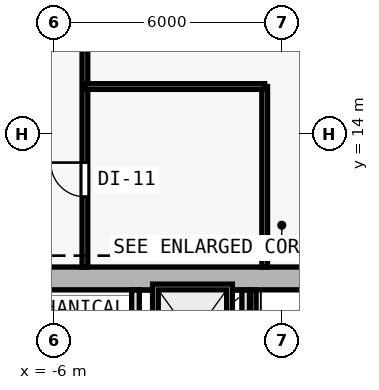
"""IFC4 building model, lengths in metres.
Left out: names, types, materials, properties, quantities, classifications, styles, units other than length and angle.
Written with IfcOpenShell. Run it as: python <this file> out.ifc"""

import sys

from ifc_helpers import new_model, si_unit, direction, frame, frame_2d, origin, place, context, subcontext, project, spatial, rectangle, extrude, element, fill, save


model = new_model("IFC4")
c1 = context("Model", 3, precision=1e-05, world=origin(), true_north=direction((0.0, 1.0)))
c2 = subcontext(c1, "Body", "Model", "MODEL_VIEW")
j1 = project(units=[si_unit("LENGTHUNIT", "METRE"), si_unit("PLANEANGLEUNIT", "RADIAN")], contexts=[c1])
p1 = place(None, origin())
s1 = spatial("IfcSite", under=j1, at=p1, CompositionType="ELEMENT")
p2 = place(p1, origin())
s2 = spatial("IfcBuilding", under=s1, at=p2, CompositionType="ELEMENT")
p3 = place(p2, frame((0.0, 0.0, 9.2)))
s3 = spatial("IfcBuildingStorey", under=s2, at=p3, CompositionType="ELEMENT", Elevation=9.2)
p4 = place(p3, frame((8.0, 10.2, 0.0), z_axis=(0.0, 0.0, 1.0), x_axis=(-1.0, 0.0, 0.0)))
e1 = element("IfcWall", 1, at=p4, inside=s3, PredefinedType="SHEAR", context=c2, shape_type="SweptSolid", body=[
    extrude(rectangle(XDim=16.0, YDim=0.6, at=frame_2d((8.0, 0.0))), origin(), (0.0, 0.0, 1.0), 3.92),
])
p5 = place(p4, frame((4.45, 0.0, 0.0)))
e2 = element("IfcOpeningElement", 2, at=p5, cuts=e1, PredefinedType="OPENING", context=c2, shape_type="SweptSolid", body=[
    extrude(rectangle(XDim=1.1, YDim=2.15, at=frame_2d((0.55, 1.075))), frame((0.0, 0.31, 0.0), z_axis=(0.0, -1.0, 0.0), x_axis=(1.0, 0.0, 0.0)), (0.0, 0.0, 1.0), 0.62),
])
p6 = place(p3, frame((-3.85, 1.35, 0.0), z_axis=(0.0, 0.0, 1.0), x_axis=(0.0, 1.0, 0.0)))
e3 = element("IfcWall", 3, at=p6, inside=s3, PredefinedType="SOLIDWALL", context=c2, shape_type="SweptSolid", body=[
    extrude(rectangle(XDim=8.545, YDim=0.2, at=frame_2d((4.272, 0.0))), origin(), (0.0, 0.0, 1.0), 3.92),
])
p7 = place(p6, frame((1.5, 0.0, 0.0)))
e4 = element("IfcOpeningElement", 4, at=p7, cuts=e3, PredefinedType="OPENING", context=c2, shape_type="SweptSolid", body=[
    extrude(rectangle(XDim=1.0, YDim=2.15, at=frame_2d((0.5, 1.075))), frame((0.0, 0.11, 0.0), z_axis=(0.0, -1.0, 0.0), x_axis=(1.0, 0.0, 0.0)), (0.0, 0.0, 1.0), 0.22),
])
p8 = place(p6, frame((3.18, 0.0, 0.0)))
e5 = element("IfcOpeningElement", 5, at=p8, cuts=e3, PredefinedType="OPENING", context=c2, shape_type="SweptSolid", body=[
    extrude(rectangle(XDim=1.0, YDim=2.15, at=frame_2d((0.5, 1.075))), frame((0.0, 0.11, 0.0), z_axis=(0.0, -1.0, 0.0), x_axis=(1.0, 0.0, 0.0)), (0.0, 0.0, 1.0), 0.22),
])
p9 = place(p3, frame((-0.95, 7.38, 0.0), z_axis=(0.0, 0.0, 1.0), x_axis=(0.0, 1.0, 0.0)))
e6 = element("IfcWall", 6, at=p9, inside=s3, PredefinedType="SOLIDWALL", context=c2, shape_type="SweptSolid", body=[
    extrude(rectangle(XDim=2.515, YDim=0.2, at=frame_2d((1.258, 0.0))), origin(), (0.0, 0.0, 1.0), 3.92),
])
p10 = place(p3, frame((-0.75, 5.92, 0.0), z_axis=(0.0, 0.0, 1.0), x_axis=(0.0, 1.0, 0.0)))
e7 = element("IfcWall", 7, at=p10, inside=s3, PredefinedType="PARTITIONING", context=c2, shape_type="SweptSolid", body=[
    extrude(rectangle(XDim=3.975, YDim=0.15, at=frame_2d((1.988, 0.0))), origin(), (0.0, 0.0, 1.0), 3.92),
])
p11 = place(p3, frame((-5.18, 10.5, 0.0), z_axis=(0.0, 0.0, 1.0), x_axis=(0.0, 1.0, 0.0)))
e8 = element("IfcWall", 8, at=p11, inside=s3, PredefinedType="PARTITIONING", context=c2, shape_type="SweptSolid", body=[
    extrude(rectangle(XDim=7.78, YDim=0.15, at=frame_2d((3.89, 0.0))), origin(), (0.0, 0.0, 1.0), 3.92),
])
p12 = place(p11, frame((1.849, 0.0, 0.0)))
e9 = element("IfcOpeningElement", 9, at=p12, cuts=e8, PredefinedType="OPENING", context=c2, shape_type="SweptSolid", body=[
    extrude(rectangle(XDim=0.9, YDim=2.1, at=frame_2d((0.45, 1.05))), frame((0.0, 0.085, 0.0), z_axis=(0.0, -1.0, 0.0), x_axis=(1.0, 0.0, 0.0)), (0.0, 0.0, 1.0), 0.17),
])
p13 = place(p3, frame((-0.45, 10.5, 0.0), z_axis=(0.0, 0.0, 1.0), x_axis=(0.0, 1.0, 0.0)))
e10 = element("IfcWall", 10, at=p13, inside=s3, PredefinedType="PARTITIONING", context=c2, shape_type="SweptSolid", body=[
    extrude(rectangle(XDim=4.75, YDim=0.15, at=frame_2d((2.375, 0.0))), origin(), (0.0, 0.0, 1.0), 3.92),
])
p14 = place(p3, frame((-5.18, 15.25, 0.0), z_axis=(0.0, 0.0, 1.0), x_axis=(1.0, 0.0, 0.0)))
e11 = element("IfcWall", 11, at=p14, inside=s3, PredefinedType="PARTITIONING", context=c2, shape_type="SweptSolid", body=[
    extrude(rectangle(XDim=4.73, YDim=0.15, at=frame_2d((2.365, 0.0))), origin(), (0.0, 0.0, 1.0), 3.92),
])
p15 = place(p12, origin())
e12 = element("IfcDoor", 12, at=p15, inside=s3, OperationType="SINGLE_SWING_RIGHT", PredefinedType="DOOR", context=c2, shape_type="SweptSolid", body=[
    extrude(rectangle(XDim=0.9, YDim=2.1, at=frame_2d((0.45, 1.05))), frame((0.0, 0.025, 0.0), z_axis=(0.0, -1.0, 0.0), x_axis=(1.0, 0.0, 0.0)), (0.0, 0.0, 1.0), 0.05),
])
fill(e9, e12)
save(model, sys.argv[1])
